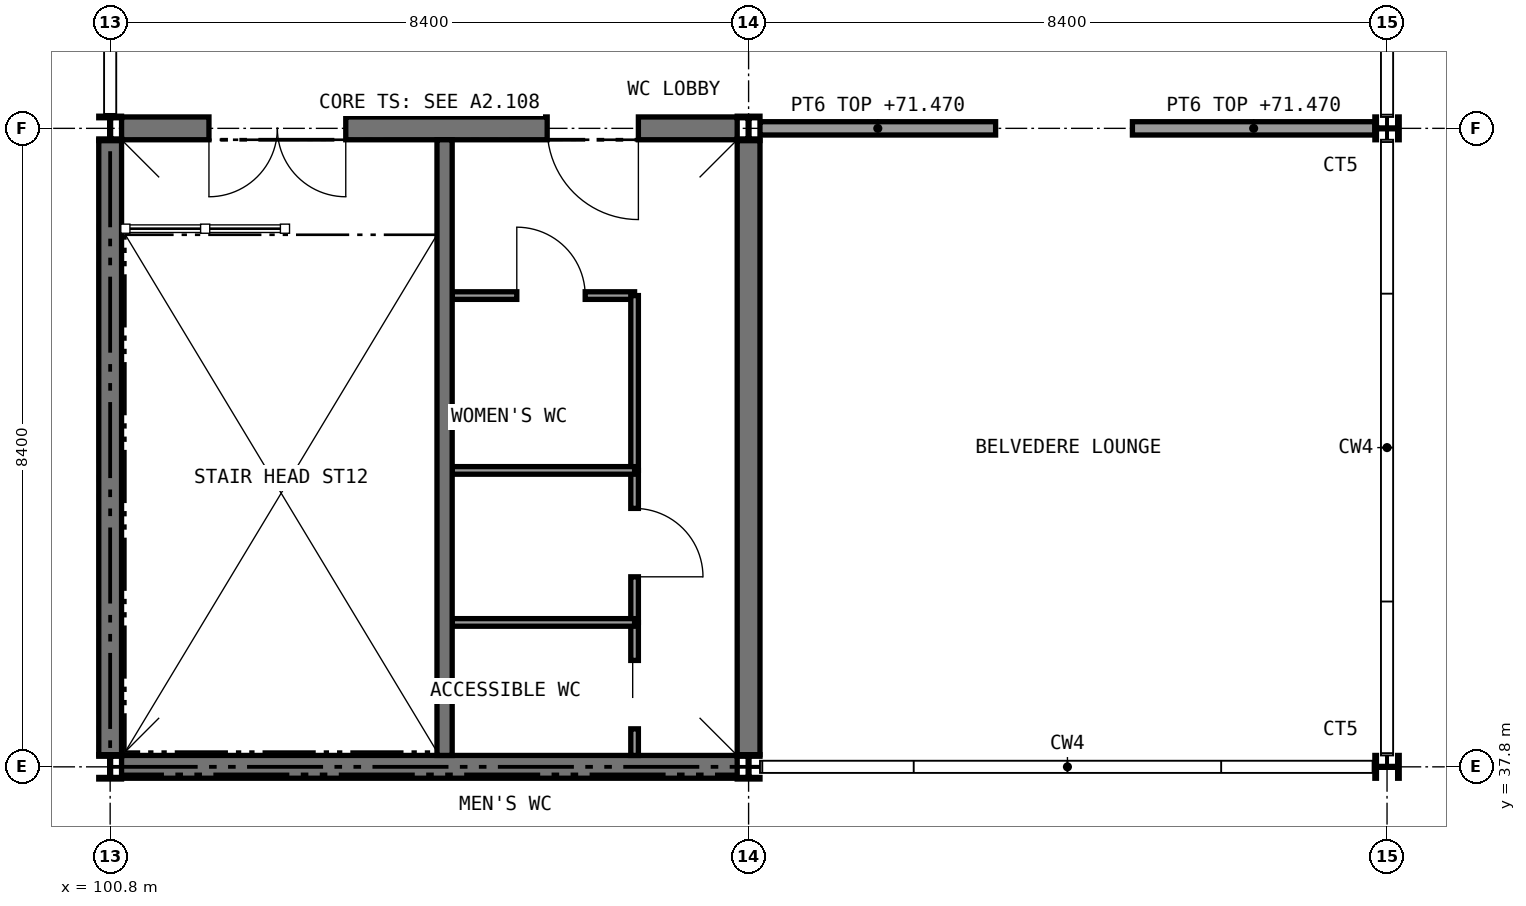
"""IFC4 building model, lengths in metres.
Left out: names, types, materials, properties, quantities, classifications, styles, units other than length and angle.
Written with IfcOpenShell. Run it as: python <this file> out.ifc"""

import sys

from ifc_helpers import new_model, si_unit, direction, frame, frame_2d, origin, origin_2d, place, context, subcontext, project, spatial, rectangle, i_section, extrude, element, fill, save


model = new_model("IFC4")
c1 = context("Model", 3, precision=1e-05, world=origin(), true_north=direction((0.0, 1.0)))
c2 = subcontext(c1, "Body", "Model", "MODEL_VIEW")
j1 = project(units=[si_unit("LENGTHUNIT", "METRE"), si_unit("PLANEANGLEUNIT", "RADIAN")], contexts=[c1])
p1 = place(None, origin())
s1 = spatial("IfcSite", under=j1, at=p1, CompositionType="ELEMENT")
p2 = place(p1, origin())
s2 = spatial("IfcBuilding", under=s1, at=p2, CompositionType="ELEMENT")
p3 = place(p2, frame((0.0, 0.0, 67.6)))
s3 = spatial("IfcBuildingStorey", under=s2, at=p3, CompositionType="ELEMENT", Elevation=67.6)
p4 = place(p3, frame((100.95, 37.8, 0.0), z_axis=(0.0, 0.0, 1.0), x_axis=(1.0, 0.0, 0.0)))
e1 = element("IfcWall", 1, at=p4, inside=s3, PredefinedType="SHEAR", context=c2, shape_type="SweptSolid", body=[
    extrude(rectangle(XDim=8.1, YDim=0.3, at=frame_2d((4.05, 0.0))), origin(), (0.0, 0.0, 1.0), 4.2),
])
p5 = place(p3, frame((100.95, 46.2, 0.0), z_axis=(0.0, 0.0, 1.0), x_axis=(1.0, 0.0, 0.0)))
e2 = element("IfcWall", 2, at=p5, inside=s3, PredefinedType="SHEAR", context=c2, shape_type="SweptSolid", body=[
    extrude(rectangle(XDim=8.1, YDim=0.3, at=frame_2d((4.05, 0.0))), origin(), (0.0, 0.0, 1.0), 4.2),
])
p6 = place(p5, frame((1.15, 0.0, 0.0)))
e3 = element("IfcOpeningElement", 3, at=p6, cuts=e2, PredefinedType="OPENING", context=c2, shape_type="SweptSolid", body=[
    extrude(rectangle(XDim=1.8, YDim=2.1, at=frame_2d((0.9, 1.05))), frame((0.0, 0.16, 0.0), z_axis=(0.0, -1.0, 0.0), x_axis=(1.0, 0.0, 0.0)), (0.0, 0.0, 1.0), 0.32),
])
p7 = place(p5, frame((5.6, 0.0, 0.0)))
e4 = element("IfcOpeningElement", 4, at=p7, cuts=e2, PredefinedType="OPENING", context=c2, shape_type="SweptSolid", body=[
    extrude(rectangle(XDim=1.2, YDim=2.1, at=frame_2d((0.6, 1.05))), frame((0.0, 0.16, 0.0), z_axis=(0.0, -1.0, 0.0), x_axis=(1.0, 0.0, 0.0)), (0.0, 0.0, 1.0), 0.32),
])
for number, where, z_axis, x_axis in (
    (5, (100.8, 37.96, 0.0), (0.0, 0.0, 1.0), (0.0, 1.0, 0.0)),
    (6, (109.2, 37.96, 0.0), (0.0, 0.0, 1.0), (0.0, 1.0, 0.0)),
):
    element("IfcWall", number, at=place(p3, frame(where, z_axis=z_axis, x_axis=x_axis)), inside=s3, PredefinedType="SHEAR", context=c2, shape_type="SweptSolid", body=[
        extrude(rectangle(XDim=8.08, YDim=0.3, at=frame_2d((4.04, 0.0))), origin(), (0.0, 0.0, 1.0), 4.2),
    ])
for number, where, z_axis, x_axis in (
    (7, (100.8, 37.8, 0.0), (0.0, 0.0, 1.0), (1.0, 0.0, 0.0)),
    (8, (100.8, 46.2, 0.0), (0.0, 0.0, 1.0), (1.0, 0.0, 0.0)),
    (9, (109.2, 37.8, 0.0), (0.0, 0.0, 1.0), (1.0, 0.0, 0.0)),
    (10, (109.2, 46.2, 0.0), (0.0, 0.0, 1.0), (1.0, 0.0, 0.0)),
    (11, (117.6, 37.8, 0.0), (0.0, 0.0, 1.0), (0.0, 1.0, 0.0)),
    (12, (117.6, 46.2, 0.0), (0.0, 0.0, 1.0), (0.0, 1.0, 0.0)),
):
    element("IfcColumn", number, at=place(p3, frame(where, z_axis=z_axis, x_axis=x_axis)), inside=s3, PredefinedType="COLUMN", context=c2, shape_type="SweptSolid", body=[
        extrude(i_section(OverallWidth=0.3, OverallDepth=0.32, WebThickness=0.011, FlangeThickness=0.021, FilletRadius=0.027, at=origin_2d()), origin(), (0.0, 0.0, 1.0), 4.4),
    ])
p8 = place(p3, frame((105.3, 44.0, 0.0), z_axis=(0.0, 0.0, 1.0), x_axis=(1.0, 0.0, 0.0)))
e13 = element("IfcWall", 13, at=p8, inside=s3, PredefinedType="PARTITIONING", context=c2, shape_type="SweptSolid", body=[
    extrude(rectangle(XDim=2.4, YDim=0.1, at=frame_2d((1.2, 0.0))), origin(), (0.0, 0.0, 1.0), 4.2),
])
p9 = place(p8, frame((0.85, 0.0, 0.0)))
e14 = element("IfcOpeningElement", 14, at=p9, cuts=e13, PredefinedType="OPENING", context=c2, shape_type="SweptSolid", body=[
    extrude(rectangle(XDim=0.9, YDim=2.1, at=frame_2d((0.45, 1.05))), frame((0.0, 0.06, 0.0), z_axis=(0.0, -1.0, 0.0), x_axis=(1.0, 0.0, 0.0)), (0.0, 0.0, 1.0), 0.12),
])
p10 = place(p3, frame((107.7, 41.7, 0.0), z_axis=(0.0, 0.0, 1.0), x_axis=(0.0, 1.0, 0.0)))
e15 = element("IfcWall", 15, at=p10, inside=s3, PredefinedType="PARTITIONING", context=c2, shape_type="SweptSolid", body=[
    extrude(rectangle(XDim=2.3, YDim=0.1, at=frame_2d((1.15, 0.0))), origin(), (0.0, 0.0, 1.0), 4.2),
])
p11 = place(p3, frame((107.7, 39.7, 0.0), z_axis=(0.0, 0.0, 1.0), x_axis=(0.0, 1.0, 0.0)))
e16 = element("IfcWall", 16, at=p11, inside=s3, PredefinedType="PARTITIONING", context=c2, shape_type="SweptSolid", body=[
    extrude(rectangle(XDim=2.0, YDim=0.1, at=frame_2d((1.0, 0.0))), origin(), (0.0, 0.0, 1.0), 4.2),
])
p12 = place(p11, frame((0.6, 0.0, 0.0)))
e17 = element("IfcOpeningElement", 17, at=p12, cuts=e16, PredefinedType="OPENING", context=c2, shape_type="SweptSolid", body=[
    extrude(rectangle(XDim=0.9, YDim=2.1, at=frame_2d((0.45, 1.05))), frame((0.0, 0.06, 0.0), z_axis=(0.0, -1.0, 0.0), x_axis=(1.0, 0.0, 0.0)), (0.0, 0.0, 1.0), 0.12),
])
p13 = place(p3, frame((107.7, 37.95, 0.0), z_axis=(0.0, 0.0, 1.0), x_axis=(0.0, 1.0, 0.0)))
e18 = element("IfcWall", 18, at=p13, inside=s3, PredefinedType="PARTITIONING", context=c2, shape_type="SweptSolid", body=[
    extrude(rectangle(XDim=1.75, YDim=0.1, at=frame_2d((0.875, 0.0))), origin(), (0.0, 0.0, 1.0), 4.2),
])
p14 = place(p13, frame((0.35, 0.0, 0.0)))
e19 = element("IfcOpeningElement", 19, at=p14, cuts=e18, PredefinedType="OPENING", context=c2, shape_type="SweptSolid", body=[
    extrude(rectangle(XDim=0.9, YDim=2.1, at=frame_2d((0.45, 1.05))), frame((0.0, 0.06, 0.0), z_axis=(0.0, -1.0, 0.0), x_axis=(1.0, 0.0, 0.0)), (0.0, 0.0, 1.0), 0.12),
])
for number, where, z_axis, x_axis in (
    (20, (105.3, 41.7, 0.0), (0.0, 0.0, 1.0), (1.0, 0.0, 0.0)),
    (21, (105.3, 39.7, 0.0), (0.0, 0.0, 1.0), (1.0, 0.0, 0.0)),
):
    element("IfcWall", number, at=place(p3, frame(where, z_axis=z_axis, x_axis=x_axis)), inside=s3, PredefinedType="PARTITIONING", context=c2, shape_type="SweptSolid", body=[
        extrude(rectangle(XDim=2.4, YDim=0.1, at=frame_2d((1.2, 0.0))), origin(), (0.0, 0.0, 1.0), 4.2),
    ])
p15 = place(p3, frame((109.35, 46.2, 0.0), z_axis=(0.0, 0.0, 1.0), x_axis=(1.0, 0.0, 0.0)))
e22 = element("IfcWall", 22, at=p15, inside=s3, PredefinedType="PARTITIONING", context=c2, shape_type="SweptSolid", body=[
    extrude(rectangle(XDim=3.1, YDim=0.175, at=frame_2d((1.55, 0.0))), origin(), (0.0, 0.0, 1.0), 3.87),
])
p16 = place(p3, frame((114.25, 46.2, 0.0), z_axis=(0.0, 0.0, 1.0), x_axis=(1.0, 0.0, 0.0)))
e23 = element("IfcWall", 23, at=p16, inside=s3, PredefinedType="PARTITIONING", context=c2, shape_type="SweptSolid", body=[
    extrude(rectangle(XDim=3.19, YDim=0.175, at=frame_2d((1.595, 0.0))), origin(), (0.0, 0.0, 1.0), 3.87),
])
p17 = place(p3, frame((105.2, 37.95, 0.0), z_axis=(0.0, 0.0, 1.0), x_axis=(0.0, 1.0, 0.0)))
e24 = element("IfcWall", 24, at=p17, inside=s3, PredefinedType="SHEAR", context=c2, shape_type="SweptSolid", body=[
    extrude(rectangle(XDim=8.1, YDim=0.2, at=frame_2d((4.05, 0.0))), origin(), (0.0, 0.0, 1.0), 4.2),
])
p18 = place(p9, origin())
e25 = element("IfcDoor", 25, at=p18, inside=s3, OperationType="SINGLE_SWING_LEFT", PredefinedType="DOOR", context=c2, shape_type="SweptSolid", body=[
    extrude(rectangle(XDim=0.9, YDim=2.1, at=frame_2d((0.45, 1.05))), frame((0.0, 0.025, 0.0), z_axis=(0.0, -1.0, 0.0), x_axis=(1.0, 0.0, 0.0)), (0.0, 0.0, 1.0), 0.05),
])
fill(e14, e25)
p19 = place(p12, frame((0.9, 0.0, 0.0), z_axis=(0.0, 0.0, 1.0), x_axis=(-1.0, 0.0, 0.0)))
e26 = element("IfcDoor", 26, at=p19, inside=s3, OperationType="SINGLE_SWING_RIGHT", PredefinedType="DOOR", context=c2, shape_type="SweptSolid", body=[
    extrude(rectangle(XDim=0.9, YDim=2.1, at=frame_2d((0.45, 1.05))), frame((0.0, 0.025, 0.0), z_axis=(0.0, -1.0, 0.0), x_axis=(1.0, 0.0, 0.0)), (0.0, 0.0, 1.0), 0.05),
])
fill(e17, e26)
p20 = place(p14, origin())
e27 = element("IfcDoor", 27, at=p20, inside=s3, OperationType="SLIDING_TO_RIGHT", PredefinedType="DOOR", context=c2, shape_type="SweptSolid", body=[
    extrude(rectangle(XDim=0.9, YDim=2.1, at=frame_2d((0.45, 1.05))), frame((0.0, 0.025, 0.0), z_axis=(0.0, -1.0, 0.0), x_axis=(1.0, 0.0, 0.0)), (0.0, 0.0, 1.0), 0.05),
])
fill(e19, e27)
p21 = place(p6, frame((1.8, 0.0, 0.0), z_axis=(0.0, 0.0, 1.0), x_axis=(-1.0, 0.0, 0.0)))
e28 = element("IfcDoor", 28, at=p21, inside=s3, OperationType="DOUBLE_DOOR_SINGLE_SWING", PredefinedType="DOOR", context=c2, shape_type="SweptSolid", body=[
    extrude(rectangle(XDim=1.8, YDim=2.1, at=frame_2d((0.9, 1.05))), frame((0.0, 0.025, 0.0), z_axis=(0.0, -1.0, 0.0), x_axis=(1.0, 0.0, 0.0)), (0.0, 0.0, 1.0), 0.05),
])
fill(e3, e28)
p22 = place(p7, frame((1.2, 0.0, 0.0), z_axis=(0.0, 0.0, 1.0), x_axis=(-1.0, 0.0, 0.0)))
e29 = element("IfcDoor", 29, at=p22, inside=s3, OperationType="SINGLE_SWING_LEFT", PredefinedType="DOOR", context=c2, shape_type="SweptSolid", body=[
    extrude(rectangle(XDim=1.2, YDim=2.1, at=frame_2d((0.6, 1.05))), frame((0.0, 0.025, 0.0), z_axis=(0.0, -1.0, 0.0), x_axis=(1.0, 0.0, 0.0)), (0.0, 0.0, 1.0), 0.05),
])
fill(e4, e29)
save(model, sys.argv[1])
